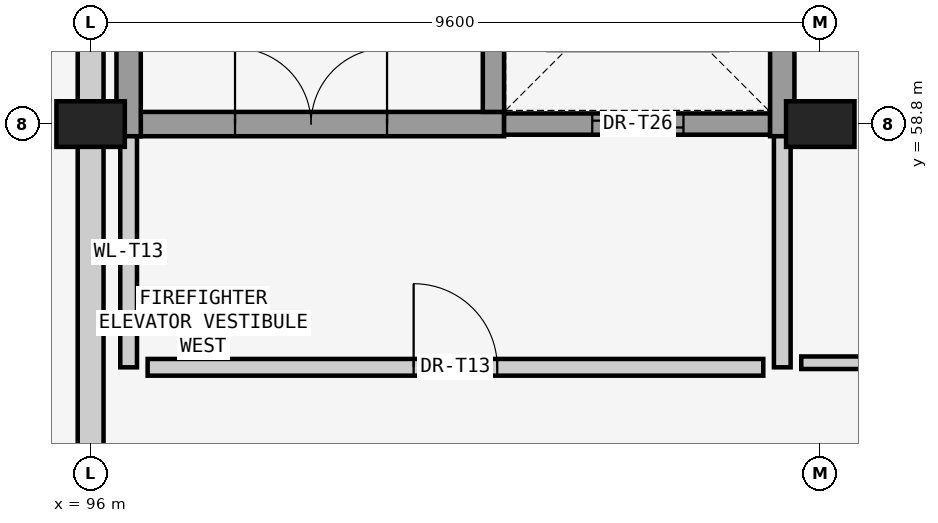
"""IFC4 building model, lengths in metres.
Left out: names, types, materials, properties, quantities, classifications, styles, units other than length and angle.
Written with IfcOpenShell. Run it as: python <this file> out.ifc"""

import sys

from ifc_helpers import new_model, si_unit, direction, frame, frame_2d, origin, origin_2d, place, context, subcontext, project, spatial, rectangle, extrude, element, fill, save


model = new_model("IFC4")
c1 = context("Model", 3, precision=1e-05, world=origin(), true_north=direction((0.0, 1.0)))
c2 = subcontext(c1, "Body", "Model", "MODEL_VIEW")
j1 = project(units=[si_unit("LENGTHUNIT", "METRE"), si_unit("PLANEANGLEUNIT", "RADIAN")], contexts=[c1])
p1 = place(None, origin())
s1 = spatial("IfcSite", under=j1, at=p1, CompositionType="ELEMENT")
p2 = place(p1, origin())
s2 = spatial("IfcBuilding", under=s1, at=p2, CompositionType="ELEMENT")
p3 = place(p2, origin())
s3 = spatial("IfcBuildingStorey", under=s2, at=p3, CompositionType="ELEMENT", Elevation=0.0)
for number, where, z_axis, x_axis in (
    (1, (96.0, 58.8, 0.0), (0.0, 0.0, 1.0), (1.0, 0.0, 0.0)),
    (2, (105.6, 58.8, 0.0), (0.0, 0.0, 1.0), (1.0, 0.0, 0.0)),
):
    element("IfcColumn", number, at=place(p3, frame(where, z_axis=z_axis, x_axis=x_axis)), inside=s3, PredefinedType="COLUMN", context=c2, shape_type="SweptSolid", body=[
        extrude(rectangle(XDim=0.9, YDim=0.6, at=origin_2d()), origin(), (0.0, 0.0, 1.0), 5.12),
    ])
p4 = place(p3, frame((96.0, 52.012, 0.0), z_axis=(0.0, 0.0, 1.0), x_axis=(0.0, 1.0, 0.0)))
e3 = element("IfcWall", 3, at=p4, inside=s3, PredefinedType="SOLIDWALL", context=c2, shape_type="SweptSolid", body=[
    extrude(rectangle(XDim=15.158, YDim=0.34, at=frame_2d((7.579, 0.0))), origin(), (0.0, 0.0, 1.0), 4.4),
])
p5 = place(p3, frame((96.66, 58.8, 0.0), z_axis=(0.0, 0.0, 1.0), x_axis=(1.0, 0.0, 0.0)))
e4 = element("IfcWall", 4, at=p5, inside=s3, PredefinedType="SHEAR", context=c2, shape_type="SweptSolid", body=[
    extrude(rectangle(XDim=4.78, YDim=0.32, at=frame_2d((2.39, 0.0))), origin(), (0.0, 0.0, 1.0), 5.1),
])
p6 = place(p5, frame((1.24, 0.0, 0.0)))
e5 = element("IfcOpeningElement", 5, at=p6, cuts=e4, PredefinedType="OPENING", context=c2, shape_type="SweptSolid", body=[
    extrude(rectangle(XDim=2.0, YDim=2.2, at=frame_2d((1.0, 1.1))), frame((0.0, 0.17, 0.0), z_axis=(0.0, -1.0, 0.0), x_axis=(1.0, 0.0, 0.0)), (0.0, 0.0, 1.0), 0.34),
])
p7 = place(p3, frame((101.44, 58.8, 0.0), z_axis=(0.0, 0.0, 1.0), x_axis=(1.0, 0.0, 0.0)))
e6 = element("IfcWall", 6, at=p7, inside=s3, PredefinedType="SHEAR", context=c2, shape_type="SweptSolid", body=[
    extrude(rectangle(XDim=3.5, YDim=0.28, at=frame_2d((1.75, 0.0))), origin(), (0.0, 0.0, 1.0), 5.1),
])
p8 = place(p7, frame((1.16, 0.0, 0.0)))
e7 = element("IfcOpeningElement", 7, at=p8, cuts=e6, PredefinedType="OPENING", context=c2, shape_type="SweptSolid", body=[
    extrude(rectangle(XDim=1.2, YDim=2.2, at=frame_2d((0.6, 1.1))), frame((0.0, 0.15, 0.0), z_axis=(0.0, -1.0, 0.0), x_axis=(1.0, 0.0, 0.0)), (0.0, 0.0, 1.0), 0.3),
])
for number, where, z_axis, x_axis in (
    (8, (96.5, 67.0, 0.0), (0.0, 0.0, 1.0), (0.0, -1.0, 0.0)),
    (9, (105.1, 58.64, 0.0), (0.0, 0.0, 1.0), (0.0, 1.0, 0.0)),
):
    element("IfcWall", number, at=place(p3, frame(where, z_axis=z_axis, x_axis=x_axis)), inside=s3, PredefinedType="SHEAR", context=c2, shape_type="SweptSolid", body=[
        extrude(rectangle(XDim=8.36, YDim=0.32, at=frame_2d((4.18, 0.0))), origin(), (0.0, 0.0, 1.0), 5.1),
    ])
p9 = place(p3, frame((101.3, 58.96, 0.0), z_axis=(0.0, 0.0, 1.0), x_axis=(0.0, 1.0, 0.0)))
e10 = element("IfcWall", 10, at=p9, inside=s3, PredefinedType="SHEAR", context=c2, shape_type="SweptSolid", body=[
    extrude(rectangle(XDim=7.72, YDim=0.28, at=frame_2d((3.86, 0.0))), origin(), (0.0, 0.0, 1.0), 5.1),
])
for number, where, z_axis, x_axis in (
    (11, (96.5, 55.6, 0.0), (0.0, 0.0, 1.0), (0.0, 1.0, 0.0)),
    (12, (105.1, 55.6, 0.0), (0.0, 0.0, 1.0), (0.0, 1.0, 0.0)),
):
    element("IfcWall", number, at=place(p3, frame(where, z_axis=z_axis, x_axis=x_axis)), inside=s3, PredefinedType="SOLIDWALL", context=c2, shape_type="SweptSolid", body=[
        extrude(rectangle(XDim=3.04, YDim=0.22, at=frame_2d((1.52, 0.0))), origin(), (0.0, 0.0, 1.0), 4.92),
    ])
p10 = place(p3, frame((96.75, 55.6, 0.0), z_axis=(0.0, 0.0, 1.0), x_axis=(1.0, 0.0, 0.0)))
e13 = element("IfcWall", 13, at=p10, inside=s3, PredefinedType="SOLIDWALL", context=c2, shape_type="SweptSolid", body=[
    extrude(rectangle(XDim=8.1, YDim=0.22, at=frame_2d((4.05, 0.0))), origin(), (0.0, 0.0, 1.0), 4.92),
])
p11 = place(p10, frame((3.5, 0.0, 0.0)))
e14 = element("IfcOpeningElement", 14, at=p11, cuts=e13, PredefinedType="OPENING", context=c2, shape_type="SweptSolid", body=[
    extrude(rectangle(XDim=1.1, YDim=2.2, at=frame_2d((0.55, 1.1))), frame((0.0, 0.12, 0.0), z_axis=(0.0, -1.0, 0.0), x_axis=(1.0, 0.0, 0.0)), (0.0, 0.0, 1.0), 0.24),
])
p12 = place(p3, frame((105.35, 55.66, 0.0), z_axis=(0.0, 0.0, 1.0), x_axis=(1.0, 0.0, 0.0)))
e15 = element("IfcWall", 15, at=p12, inside=s3, PredefinedType="PARTITIONING", context=c2, shape_type="SweptSolid", body=[
    extrude(rectangle(XDim=11.05, YDim=0.165, at=frame_2d((5.525, 0.0))), origin(), (0.0, 0.0, 1.0), 4.99),
])
p13 = place(p12, frame((5.05, 0.0, 0.0)))
e16 = element("IfcOpeningElement", 16, at=p13, cuts=e15, PredefinedType="OPENING", context=c2, shape_type="SweptSolid", body=[
    extrude(rectangle(XDim=0.95, YDim=2.15, at=frame_2d((0.475, 1.075))), frame((0.0, 0.093, 0.0), z_axis=(0.0, -1.0, 0.0), x_axis=(1.0, 0.0, 0.0)), (0.0, 0.0, 1.0), 0.185),
])
p14 = place(p6, origin())
e17 = element("IfcDoor", 17, at=p14, inside=s3, OperationType="DOUBLE_SWING_LEFT", PredefinedType="DOOR", context=c2, shape_type="SweptSolid", body=[
    extrude(rectangle(XDim=2.0, YDim=2.2, at=frame_2d((1.0, 1.1))), frame((0.0, 0.025, 0.0), z_axis=(0.0, -1.0, 0.0), x_axis=(1.0, 0.0, 0.0)), (0.0, 0.0, 1.0), 0.05),
])
fill(e5, e17)
p15 = place(p8, origin())
e18 = element("IfcDoor", 18, at=p15, inside=s3, OperationType="SLIDING_TO_RIGHT", PredefinedType="DOOR", context=c2, shape_type="SweptSolid", body=[
    extrude(rectangle(XDim=1.2, YDim=2.2, at=frame_2d((0.6, 1.1))), frame((0.0, 0.025, 0.0), z_axis=(0.0, -1.0, 0.0), x_axis=(1.0, 0.0, 0.0)), (0.0, 0.0, 1.0), 0.05),
])
fill(e7, e18)
p16 = place(p11, origin())
e19 = element("IfcDoor", 19, at=p16, inside=s3, OperationType="SINGLE_SWING_LEFT", PredefinedType="DOOR", context=c2, shape_type="SweptSolid", body=[
    extrude(rectangle(XDim=1.1, YDim=2.2, at=frame_2d((0.55, 1.1))), frame((0.0, 0.025, 0.0), z_axis=(0.0, -1.0, 0.0), x_axis=(1.0, 0.0, 0.0)), (0.0, 0.0, 1.0), 0.05),
])
fill(e14, e19)
save(model, sys.argv[1])
